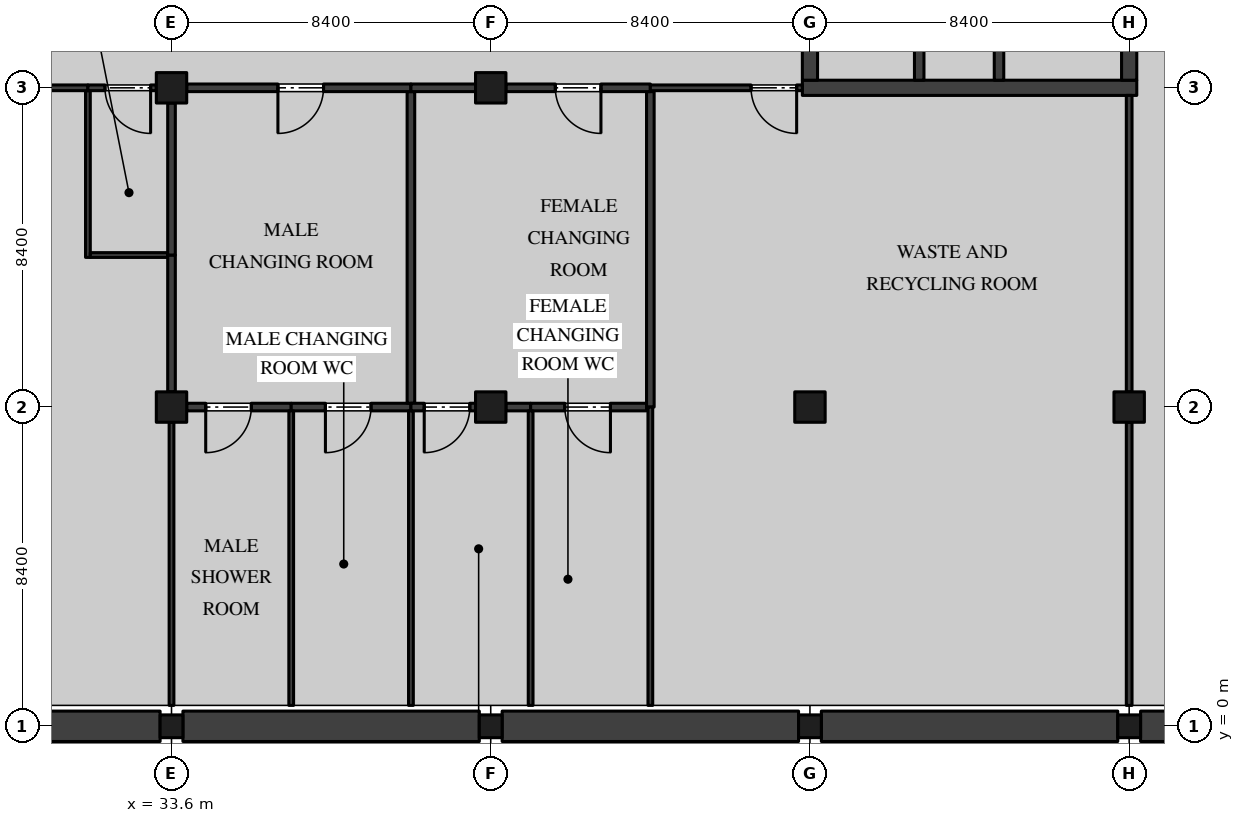
"""IFC4 building model, lengths in metres.
Left out: names, types, materials, properties, quantities, classifications, styles, units other than length and angle.
Written with IfcOpenShell. Run it as: python <this file> out.ifc"""

import sys

from ifc_helpers import new_model, si_unit, direction, frame, frame_2d, origin, origin_2d, place, context, subcontext, project, spatial, rectangle, extrude, element, fill, save


model = new_model("IFC4")
c1 = context("Model", 3, precision=1e-05, world=origin(), true_north=direction((0.0, 1.0)))
c2 = subcontext(c1, "Body", "Model", "MODEL_VIEW")
j1 = project(units=[si_unit("LENGTHUNIT", "METRE"), si_unit("PLANEANGLEUNIT", "RADIAN")], contexts=[c1])
p1 = place(None, origin())
s1 = spatial("IfcSite", under=j1, at=p1, CompositionType="ELEMENT")
p2 = place(p1, origin())
s2 = spatial("IfcBuilding", under=s1, at=p2, CompositionType="ELEMENT")
p3 = place(p2, frame((0.0, 0.0, -4.5)))
s3 = spatial("IfcBuildingStorey", under=s2, at=p3, CompositionType="ELEMENT", Elevation=-4.5)
p4 = place(p3, frame((33.6, 0.0, 0.0), z_axis=(0.0, 0.0, 1.0), x_axis=(1.0, 0.0, 0.0)))
e1 = element("IfcColumn", 1, at=p4, inside=s3, PredefinedType="COLUMN", context=c2, shape_type="SweptSolid", body=[
    extrude(rectangle(XDim=0.6, YDim=0.6, at=origin_2d()), origin(), (0.0, 0.0, 1.0), 4.05),
])
for number, where, z_axis, x_axis in (
    (2, (33.6, 8.4, 0.0), (0.0, 0.0, 1.0), (1.0, 0.0, 0.0)),
    (3, (33.6, 16.8, 0.0), (0.0, 0.0, 1.0), (1.0, 0.0, 0.0)),
):
    element("IfcColumn", number, at=place(p3, frame(where, z_axis=z_axis, x_axis=x_axis)), inside=s3, PredefinedType="COLUMN", context=c2, shape_type="SweptSolid", body=[
        extrude(rectangle(XDim=0.8, YDim=0.8, at=origin_2d()), origin(), (0.0, 0.0, 1.0), 4.05),
    ])
p5 = place(p3, frame((42.0, 0.0, 0.0), z_axis=(0.0, 0.0, 1.0), x_axis=(1.0, 0.0, 0.0)))
e4 = element("IfcColumn", 4, at=p5, inside=s3, PredefinedType="COLUMN", context=c2, shape_type="SweptSolid", body=[
    extrude(rectangle(XDim=0.6, YDim=0.6, at=origin_2d()), origin(), (0.0, 0.0, 1.0), 4.05),
])
for number, where, z_axis, x_axis in (
    (5, (42.0, 8.4, 0.0), (0.0, 0.0, 1.0), (1.0, 0.0, 0.0)),
    (6, (42.0, 16.8, 0.0), (0.0, 0.0, 1.0), (1.0, 0.0, 0.0)),
):
    element("IfcColumn", number, at=place(p3, frame(where, z_axis=z_axis, x_axis=x_axis)), inside=s3, PredefinedType="COLUMN", context=c2, shape_type="SweptSolid", body=[
        extrude(rectangle(XDim=0.8, YDim=0.8, at=origin_2d()), origin(), (0.0, 0.0, 1.0), 4.05),
    ])
p6 = place(p3, frame((50.4, 0.0, 0.0), z_axis=(0.0, 0.0, 1.0), x_axis=(1.0, 0.0, 0.0)))
e7 = element("IfcColumn", 7, at=p6, inside=s3, PredefinedType="COLUMN", context=c2, shape_type="SweptSolid", body=[
    extrude(rectangle(XDim=0.6, YDim=0.6, at=origin_2d()), origin(), (0.0, 0.0, 1.0), 4.05),
])
p7 = place(p3, frame((50.4, 8.4, 0.0), z_axis=(0.0, 0.0, 1.0), x_axis=(1.0, 0.0, 0.0)))
e8 = element("IfcColumn", 8, at=p7, inside=s3, PredefinedType="COLUMN", context=c2, shape_type="SweptSolid", body=[
    extrude(rectangle(XDim=0.8, YDim=0.8, at=origin_2d()), origin(), (0.0, 0.0, 1.0), 4.05),
])
p8 = place(p3, frame((58.8, 0.0, 0.0), z_axis=(0.0, 0.0, 1.0), x_axis=(1.0, 0.0, 0.0)))
e9 = element("IfcColumn", 9, at=p8, inside=s3, PredefinedType="COLUMN", context=c2, shape_type="SweptSolid", body=[
    extrude(rectangle(XDim=0.6, YDim=0.6, at=origin_2d()), origin(), (0.0, 0.0, 1.0), 4.05),
])
p9 = place(p3, frame((58.8, 8.4, 0.0), z_axis=(0.0, 0.0, 1.0), x_axis=(1.0, 0.0, 0.0)))
e10 = element("IfcColumn", 10, at=p9, inside=s3, PredefinedType="COLUMN", context=c2, shape_type="SweptSolid", body=[
    extrude(rectangle(XDim=0.8, YDim=0.8, at=origin_2d()), origin(), (0.0, 0.0, 1.0), 4.05),
])
for number, where, z_axis, x_axis in (
    (11, (25.5, 0.0, 0.0), (0.0, 0.0, 1.0), (1.0, 0.0, 0.0)),
    (12, (33.9, 0.0, 0.0), (0.0, 0.0, 1.0), (1.0, 0.0, 0.0)),
    (13, (42.3, 0.0, 0.0), (0.0, 0.0, 1.0), (1.0, 0.0, 0.0)),
    (14, (50.7, 0.0, 0.0), (0.0, 0.0, 1.0), (1.0, 0.0, 0.0)),
):
    element("IfcWall", number, at=place(p3, frame(where, z_axis=z_axis, x_axis=x_axis)), inside=s3, PredefinedType="SOLIDWALL", context=c2, shape_type="SweptSolid", body=[
        extrude(rectangle(XDim=7.8, YDim=0.8, at=frame_2d((3.9, 0.0))), origin(), (0.0, 0.0, 1.0), 4.05),
    ])
p10 = place(p3, frame((59.1, 0.0, 0.0), z_axis=(0.0, 0.0, 1.0), x_axis=(1.0, 0.0, 0.0)))
e15 = element("IfcWall", 15, at=p10, inside=s3, PredefinedType="SOLIDWALL", context=c2, shape_type="SweptSolid", body=[
    extrude(rectangle(XDim=7.8, YDim=0.8, at=frame_2d((3.9, 0.0))), origin(), (0.0, 0.0, 1.0), 4.05),
])
p11 = place(p3, frame((50.2, 16.8, 0.0), z_axis=(0.0, 0.0, 1.0), x_axis=(1.0, 0.0, 0.0)))
e16 = element("IfcWall", 16, at=p11, inside=s3, PredefinedType="SHEAR", context=c2, shape_type="SweptSolid", body=[
    extrude(rectangle(XDim=8.8, YDim=0.4, at=frame_2d((4.4, 0.0))), origin(), (0.0, 0.0, 1.0), 4.05),
])
p12 = place(p3, frame((50.4, 17.0, 0.0), z_axis=(0.0, 0.0, 1.0), x_axis=(0.0, 1.0, 0.0)))
e17 = element("IfcWall", 17, at=p12, inside=s3, PredefinedType="SHEAR", context=c2, shape_type="SweptSolid", body=[
    extrude(rectangle(XDim=8.0, YDim=0.4, at=frame_2d((4.0, 0.0))), origin(), (0.0, 0.0, 1.0), 4.05),
])
p13 = place(p12, frame((6.2, 0.0, 0.0)))
e18 = element("IfcOpeningElement", 18, at=p13, cuts=e17, PredefinedType="OPENING", context=c2, shape_type="SweptSolid", body=[
    extrude(rectangle(XDim=1.2, YDim=2.1, at=frame_2d((0.6, 1.05))), frame((0.0, 0.21, 0.0), z_axis=(0.0, -1.0, 0.0), x_axis=(1.0, 0.0, 0.0)), (0.0, 0.0, 1.0), 0.42),
])
p14 = place(p3, frame((58.8, 17.0, 0.0), z_axis=(0.0, 0.0, 1.0), x_axis=(0.0, 1.0, 0.0)))
e19 = element("IfcWall", 19, at=p14, inside=s3, PredefinedType="SHEAR", context=c2, shape_type="SweptSolid", body=[
    extrude(rectangle(XDim=8.0, YDim=0.4, at=frame_2d((4.0, 0.0))), origin(), (0.0, 0.0, 1.0), 4.05),
])
p15 = place(p3, frame((55.375, 25.0, 0.0), z_axis=(0.0, 0.0, 1.0), x_axis=(0.0, -1.0, 0.0)))
e20 = element("IfcWall", 20, at=p15, inside=s3, PredefinedType="SOLIDWALL", context=c2, shape_type="SweptSolid", body=[
    extrude(rectangle(XDim=8.0, YDim=0.25, at=frame_2d((4.0, 0.0))), origin(), (0.0, 0.0, 1.0), 4.05),
])
p16 = place(p15, frame((0.2, 0.0, 0.0)))
e21 = element("IfcOpeningElement", 21, at=p16, cuts=e20, PredefinedType="OPENING", context=c2, shape_type="SweptSolid", body=[
    extrude(rectangle(XDim=1.1, YDim=2.1, at=frame_2d((0.55, 1.05))), frame((0.0, 0.135, 0.0), z_axis=(0.0, -1.0, 0.0), x_axis=(1.0, 0.0, 0.0)), (0.0, 0.0, 1.0), 0.27),
])
p17 = place(p3, frame((53.275, 19.95, 0.0), z_axis=(0.0, 0.0, 1.0), x_axis=(0.0, -1.0, 0.0)))
e22 = element("IfcWall", 22, at=p17, inside=s3, PredefinedType="SOLIDWALL", context=c2, shape_type="SweptSolid", body=[
    extrude(rectangle(XDim=2.95, YDim=0.25, at=frame_2d((1.475, 0.0))), origin(), (0.0, 0.0, 1.0), 4.05),
])
p18 = place(p17, frame((1.075, 0.0, 0.0)))
e23 = element("IfcOpeningElement", 23, at=p18, cuts=e22, PredefinedType="OPENING", context=c2, shape_type="SweptSolid", body=[
    extrude(rectangle(XDim=0.8, YDim=2.1, at=frame_2d((0.4, 1.05))), frame((0.0, 0.135, 0.0), z_axis=(0.0, -1.0, 0.0), x_axis=(1.0, 0.0, 0.0)), (0.0, 0.0, 1.0), 0.27),
])
p19 = place(p3, frame((31.4, 12.338, 0.0), z_axis=(0.0, 0.0, 1.0), x_axis=(0.0, 1.0, 0.0)))
e24 = element("IfcWall", 24, at=p19, inside=s3, PredefinedType="PARTITIONING", context=c2, shape_type="SweptSolid", body=[
    extrude(rectangle(XDim=4.387, YDim=0.125, at=frame_2d((2.194, 0.0))), origin(), (0.0, 0.0, 1.0), 4.05),
])
p20 = place(p3, frame((31.462, 12.4, 0.0), z_axis=(0.0, 0.0, 1.0), x_axis=(1.0, 0.0, 0.0)))
e25 = element("IfcWall", 25, at=p20, inside=s3, PredefinedType="PARTITIONING", context=c2, shape_type="SweptSolid", body=[
    extrude(rectangle(XDim=2.038, YDim=0.125, at=frame_2d((1.019, 0.0))), origin(), (0.0, 0.0, 1.0), 4.05),
])
p21 = place(p3, frame((33.6, 8.8, 0.0), z_axis=(0.0, 0.0, 1.0), x_axis=(0.0, 1.0, 0.0)))
e26 = element("IfcWall", 26, at=p21, inside=s3, PredefinedType="PARTITIONING", context=c2, shape_type="SweptSolid", body=[
    extrude(rectangle(XDim=3.6, YDim=0.2, at=frame_2d((1.8, 0.0))), origin(), (0.0, 0.0, 1.0), 4.05),
])
p22 = place(p3, frame((33.6, 0.55, 0.0), z_axis=(0.0, 0.0, 1.0), x_axis=(0.0, 1.0, 0.0)))
e27 = element("IfcWall", 27, at=p22, inside=s3, PredefinedType="PARTITIONING", context=c2, shape_type="SweptSolid", body=[
    extrude(rectangle(XDim=7.45, YDim=0.125, at=frame_2d((3.725, 0.0))), origin(), (0.0, 0.0, 1.0), 4.05),
])
p23 = place(p3, frame((25.6, 16.8, 0.0), z_axis=(0.0, 0.0, 1.0), x_axis=(1.0, 0.0, 0.0)))
e28 = element("IfcWall", 28, at=p23, inside=s3, PredefinedType="PARTITIONING", context=c2, shape_type="SweptSolid", body=[
    extrude(rectangle(XDim=5.8, YDim=0.15, at=frame_2d((2.9, 0.0))), origin(), (0.0, 0.0, 1.0), 4.05),
])
p24 = place(p23, frame((1.8, 0.0, 0.0)))
e29 = element("IfcOpeningElement", 29, at=p24, cuts=e28, PredefinedType="OPENING", context=c2, shape_type="SweptSolid", body=[
    extrude(rectangle(XDim=1.2, YDim=2.1, at=frame_2d((0.6, 1.05))), frame((0.0, 0.085, 0.0), z_axis=(0.0, -1.0, 0.0), x_axis=(1.0, 0.0, 0.0)), (0.0, 0.0, 1.0), 0.17),
])
p25 = place(p3, frame((33.6, 12.4, 0.0), z_axis=(0.0, 0.0, 1.0), x_axis=(0.0, 1.0, 0.0)))
e30 = element("IfcWall", 30, at=p25, inside=s3, PredefinedType="PARTITIONING", context=c2, shape_type="SweptSolid", body=[
    extrude(rectangle(XDim=4.0, YDim=0.2, at=frame_2d((2.0, 0.0))), origin(), (0.0, 0.0, 1.0), 4.05),
])
p26 = place(p3, frame((31.4, 16.8, 0.0), z_axis=(0.0, 0.0, 1.0), x_axis=(1.0, 0.0, 0.0)))
e31 = element("IfcWall", 31, at=p26, inside=s3, PredefinedType="PARTITIONING", context=c2, shape_type="SweptSolid", body=[
    extrude(rectangle(XDim=1.8, YDim=0.15, at=frame_2d((0.9, 0.0))), origin(), (0.0, 0.0, 1.0), 4.05),
])
p27 = place(p26, frame((0.45, 0.0, 0.0)))
e32 = element("IfcOpeningElement", 32, at=p27, cuts=e31, PredefinedType="OPENING", context=c2, shape_type="SweptSolid", body=[
    extrude(rectangle(XDim=1.2, YDim=2.1, at=frame_2d((0.6, 1.05))), frame((0.0, 0.085, 0.0), z_axis=(0.0, -1.0, 0.0), x_axis=(1.0, 0.0, 0.0)), (0.0, 0.0, 1.0), 0.17),
])
p28 = place(p3, frame((34.0, 8.4, 0.0), z_axis=(0.0, 0.0, 1.0), x_axis=(1.0, 0.0, 0.0)))
e33 = element("IfcWall", 33, at=p28, inside=s3, PredefinedType="PARTITIONING", context=c2, shape_type="SweptSolid", body=[
    extrude(rectangle(XDim=2.75, YDim=0.2, at=frame_2d((1.375, 0.0))), origin(), (0.0, 0.0, 1.0), 4.05),
])
p29 = place(p28, frame((0.5, 0.0, 0.0)))
e34 = element("IfcOpeningElement", 34, at=p29, cuts=e33, PredefinedType="OPENING", context=c2, shape_type="SweptSolid", body=[
    extrude(rectangle(XDim=1.2, YDim=2.1, at=frame_2d((0.6, 1.05))), frame((0.0, 0.11, 0.0), z_axis=(0.0, -1.0, 0.0), x_axis=(1.0, 0.0, 0.0)), (0.0, 0.0, 1.0), 0.22),
])
p30 = place(p3, frame((36.75, 8.4, 0.0), z_axis=(0.0, 0.0, 1.0), x_axis=(1.0, 0.0, 0.0)))
e35 = element("IfcWall", 35, at=p30, inside=s3, PredefinedType="PARTITIONING", context=c2, shape_type="SweptSolid", body=[
    extrude(rectangle(XDim=3.15, YDim=0.2, at=frame_2d((1.575, 0.0))), origin(), (0.0, 0.0, 1.0), 4.05),
])
p31 = place(p30, frame((0.9, 0.0, 0.0)))
e36 = element("IfcOpeningElement", 36, at=p31, cuts=e35, PredefinedType="OPENING", context=c2, shape_type="SweptSolid", body=[
    extrude(rectangle(XDim=1.2, YDim=2.1, at=frame_2d((0.6, 1.05))), frame((0.0, 0.11, 0.0), z_axis=(0.0, -1.0, 0.0), x_axis=(1.0, 0.0, 0.0)), (0.0, 0.0, 1.0), 0.22),
])
p32 = place(p3, frame((39.9, 8.5, 0.0), z_axis=(0.0, 0.0, 1.0), x_axis=(0.0, 1.0, 0.0)))
e37 = element("IfcWall", 37, at=p32, inside=s3, PredefinedType="PARTITIONING", context=c2, shape_type="SweptSolid", body=[
    extrude(rectangle(XDim=8.2, YDim=0.2, at=frame_2d((4.1, 0.0))), origin(), (0.0, 0.0, 1.0), 4.05),
])
p33 = place(p3, frame((34.0, 16.8, 0.0), z_axis=(0.0, 0.0, 1.0), x_axis=(1.0, 0.0, 0.0)))
e38 = element("IfcWall", 38, at=p33, inside=s3, PredefinedType="PARTITIONING", context=c2, shape_type="SweptSolid", body=[
    extrude(rectangle(XDim=5.9, YDim=0.2, at=frame_2d((2.95, 0.0))), origin(), (0.0, 0.0, 1.0), 4.05),
])
p34 = place(p33, frame((2.4, 0.0, 0.0)))
e39 = element("IfcOpeningElement", 39, at=p34, cuts=e38, PredefinedType="OPENING", context=c2, shape_type="SweptSolid", body=[
    extrude(rectangle(XDim=1.2, YDim=2.1, at=frame_2d((0.6, 1.05))), frame((0.0, 0.11, 0.0), z_axis=(0.0, -1.0, 0.0), x_axis=(1.0, 0.0, 0.0)), (0.0, 0.0, 1.0), 0.22),
])
for number, where, z_axis, x_axis in (
    (40, (36.75, 0.55, 0.0), (0.0, 0.0, 1.0), (0.0, 1.0, 0.0)),
    (41, (39.9, 0.55, 0.0), (0.0, 0.0, 1.0), (0.0, 1.0, 0.0)),
):
    element("IfcWall", number, at=place(p3, frame(where, z_axis=z_axis, x_axis=x_axis)), inside=s3, PredefinedType="PARTITIONING", context=c2, shape_type="SweptSolid", body=[
        extrude(rectangle(XDim=7.75, YDim=0.125, at=frame_2d((3.875, 0.0))), origin(), (0.0, 0.0, 1.0), 4.05),
    ])
p35 = place(p3, frame((39.9, 8.4, 0.0), z_axis=(0.0, 0.0, 1.0), x_axis=(1.0, 0.0, 0.0)))
e42 = element("IfcWall", 42, at=p35, inside=s3, PredefinedType="PARTITIONING", context=c2, shape_type="SweptSolid", body=[
    extrude(rectangle(XDim=1.7, YDim=0.2, at=frame_2d((0.85, 0.0))), origin(), (0.0, 0.0, 1.0), 4.05),
])
p36 = place(p35, frame((0.35, 0.0, 0.0)))
e43 = element("IfcOpeningElement", 43, at=p36, cuts=e42, PredefinedType="OPENING", context=c2, shape_type="SweptSolid", body=[
    extrude(rectangle(XDim=1.2, YDim=2.1, at=frame_2d((0.6, 1.05))), frame((0.0, 0.11, 0.0), z_axis=(0.0, -1.0, 0.0), x_axis=(1.0, 0.0, 0.0)), (0.0, 0.0, 1.0), 0.22),
])
p37 = place(p3, frame((42.4, 8.4, 0.0), z_axis=(0.0, 0.0, 1.0), x_axis=(1.0, 0.0, 0.0)))
e44 = element("IfcWall", 44, at=p37, inside=s3, PredefinedType="PARTITIONING", context=c2, shape_type="SweptSolid", body=[
    extrude(rectangle(XDim=0.65, YDim=0.2, at=frame_2d((0.325, 0.0))), origin(), (0.0, 0.0, 1.0), 4.05),
])
p38 = place(p3, frame((43.05, 8.4, 0.0), z_axis=(0.0, 0.0, 1.0), x_axis=(1.0, 0.0, 0.0)))
e45 = element("IfcWall", 45, at=p38, inside=s3, PredefinedType="PARTITIONING", context=c2, shape_type="SweptSolid", body=[
    extrude(rectangle(XDim=3.05, YDim=0.2, at=frame_2d((1.525, 0.0))), origin(), (0.0, 0.0, 1.0), 4.05),
])
p39 = place(p38, frame((0.9, 0.0, 0.0)))
e46 = element("IfcOpeningElement", 46, at=p39, cuts=e45, PredefinedType="OPENING", context=c2, shape_type="SweptSolid", body=[
    extrude(rectangle(XDim=1.2, YDim=2.1, at=frame_2d((0.6, 1.05))), frame((0.0, 0.11, 0.0), z_axis=(0.0, -1.0, 0.0), x_axis=(1.0, 0.0, 0.0)), (0.0, 0.0, 1.0), 0.22),
])
p40 = place(p3, frame((46.2, 8.4, 0.0), z_axis=(0.0, 0.0, 1.0), x_axis=(0.0, 1.0, 0.0)))
e47 = element("IfcWall", 47, at=p40, inside=s3, PredefinedType="PARTITIONING", context=c2, shape_type="SweptSolid", body=[
    extrude(rectangle(XDim=8.3, YDim=0.2, at=frame_2d((4.15, 0.0))), origin(), (0.0, 0.0, 1.0), 4.05),
])
p41 = place(p3, frame((39.9, 16.8, 0.0), z_axis=(0.0, 0.0, 1.0), x_axis=(1.0, 0.0, 0.0)))
e48 = element("IfcWall", 48, at=p41, inside=s3, PredefinedType="PARTITIONING", context=c2, shape_type="SweptSolid", body=[
    extrude(rectangle(XDim=1.7, YDim=0.2, at=frame_2d((0.85, 0.0))), origin(), (0.0, 0.0, 1.0), 4.05),
])
p42 = place(p3, frame((42.4, 16.8, 0.0), z_axis=(0.0, 0.0, 1.0), x_axis=(1.0, 0.0, 0.0)))
e49 = element("IfcWall", 49, at=p42, inside=s3, PredefinedType="PARTITIONING", context=c2, shape_type="SweptSolid", body=[
    extrude(rectangle(XDim=3.8, YDim=0.2, at=frame_2d((1.9, 0.0))), origin(), (0.0, 0.0, 1.0), 4.05),
])
p43 = place(p42, frame((1.3, 0.0, 0.0)))
e50 = element("IfcOpeningElement", 50, at=p43, cuts=e49, PredefinedType="OPENING", context=c2, shape_type="SweptSolid", body=[
    extrude(rectangle(XDim=1.2, YDim=2.1, at=frame_2d((0.6, 1.05))), frame((0.0, 0.11, 0.0), z_axis=(0.0, -1.0, 0.0), x_axis=(1.0, 0.0, 0.0)), (0.0, 0.0, 1.0), 0.22),
])
p44 = place(p3, frame((43.05, 0.55, 0.0), z_axis=(0.0, 0.0, 1.0), x_axis=(0.0, 1.0, 0.0)))
e51 = element("IfcWall", 51, at=p44, inside=s3, PredefinedType="PARTITIONING", context=c2, shape_type="SweptSolid", body=[
    extrude(rectangle(XDim=7.75, YDim=0.125, at=frame_2d((3.875, 0.0))), origin(), (0.0, 0.0, 1.0), 4.05),
])
p45 = place(p3, frame((46.2, 0.55, 0.0), z_axis=(0.0, 0.0, 1.0), x_axis=(0.0, 1.0, 0.0)))
e52 = element("IfcWall", 52, at=p45, inside=s3, PredefinedType="PARTITIONING", context=c2, shape_type="SweptSolid", body=[
    extrude(rectangle(XDim=7.85, YDim=0.125, at=frame_2d((3.925, 0.0))), origin(), (0.0, 0.0, 1.0), 4.05),
])
p46 = place(p3, frame((46.2, 16.8, 0.0), z_axis=(0.0, 0.0, 1.0), x_axis=(1.0, 0.0, 0.0)))
e53 = element("IfcWall", 53, at=p46, inside=s3, PredefinedType="PARTITIONING", context=c2, shape_type="SweptSolid", body=[
    extrude(rectangle(XDim=4.0, YDim=0.15, at=frame_2d((2.0, 0.0))), origin(), (0.0, 0.0, 1.0), 4.05),
])
p47 = place(p46, frame((2.65, 0.0, 0.0)))
e54 = element("IfcOpeningElement", 54, at=p47, cuts=e53, PredefinedType="OPENING", context=c2, shape_type="SweptSolid", body=[
    extrude(rectangle(XDim=1.2, YDim=2.1, at=frame_2d((0.6, 1.05))), frame((0.0, 0.085, 0.0), z_axis=(0.0, -1.0, 0.0), x_axis=(1.0, 0.0, 0.0)), (0.0, 0.0, 1.0), 0.17),
])
p48 = place(p3, frame((58.8, 0.55, 0.0), z_axis=(0.0, 0.0, 1.0), x_axis=(0.0, 1.0, 0.0)))
e55 = element("IfcWall", 55, at=p48, inside=s3, PredefinedType="PARTITIONING", context=c2, shape_type="SweptSolid", body=[
    extrude(rectangle(XDim=7.45, YDim=0.15, at=frame_2d((3.725, 0.0))), origin(), (0.0, 0.0, 1.0), 4.05),
])
p49 = place(p3, frame((58.8, 8.8, 0.0), z_axis=(0.0, 0.0, 1.0), x_axis=(0.0, 1.0, 0.0)))
e56 = element("IfcWall", 56, at=p49, inside=s3, PredefinedType="PARTITIONING", context=c2, shape_type="SweptSolid", body=[
    extrude(rectangle(XDim=7.8, YDim=0.15, at=frame_2d((3.9, 0.0))), origin(), (0.0, 0.0, 1.0), 4.05),
])
p50 = place(p27, frame((1.2, 0.0, 0.0), z_axis=(0.0, 0.0, 1.0), x_axis=(-1.0, 0.0, 0.0)))
e57 = element("IfcDoor", 57, at=p50, inside=s3, OperationType="SINGLE_SWING_RIGHT", PredefinedType="DOOR", context=c2, shape_type="SweptSolid", body=[
    extrude(rectangle(XDim=1.2, YDim=2.1, at=frame_2d((0.6, 1.05))), frame((0.0, 0.03, 0.0), z_axis=(0.0, -1.0, 0.0), x_axis=(1.0, 0.0, 0.0)), (0.0, 0.0, 1.0), 0.06),
])
fill(e32, e57)
p51 = place(p34, frame((1.2, 0.0, 0.0), z_axis=(0.0, 0.0, 1.0), x_axis=(-1.0, 0.0, 0.0)))
e58 = element("IfcDoor", 58, at=p51, inside=s3, OperationType="SINGLE_SWING_LEFT", PredefinedType="DOOR", context=c2, shape_type="SweptSolid", body=[
    extrude(rectangle(XDim=1.2, YDim=2.1, at=frame_2d((0.6, 1.05))), frame((0.0, 0.035, 0.0), z_axis=(0.0, -1.0, 0.0), x_axis=(1.0, 0.0, 0.0)), (0.0, 0.0, 1.0), 0.07),
])
fill(e39, e58)
p52 = place(p29, frame((1.2, 0.0, 0.0), z_axis=(0.0, 0.0, 1.0), x_axis=(-1.0, 0.0, 0.0)))
e59 = element("IfcDoor", 59, at=p52, inside=s3, OperationType="SINGLE_SWING_LEFT", PredefinedType="DOOR", context=c2, shape_type="SweptSolid", body=[
    extrude(rectangle(XDim=1.2, YDim=2.1, at=frame_2d((0.6, 1.05))), frame((0.0, 0.035, 0.0), z_axis=(0.0, -1.0, 0.0), x_axis=(1.0, 0.0, 0.0)), (0.0, 0.0, 1.0), 0.07),
])
fill(e34, e59)
p53 = place(p31, frame((1.2, 0.0, 0.0), z_axis=(0.0, 0.0, 1.0), x_axis=(-1.0, 0.0, 0.0)))
e60 = element("IfcDoor", 60, at=p53, inside=s3, OperationType="SINGLE_SWING_LEFT", PredefinedType="DOOR", context=c2, shape_type="SweptSolid", body=[
    extrude(rectangle(XDim=1.2, YDim=2.1, at=frame_2d((0.6, 1.05))), frame((0.0, 0.035, 0.0), z_axis=(0.0, -1.0, 0.0), x_axis=(1.0, 0.0, 0.0)), (0.0, 0.0, 1.0), 0.07),
])
fill(e36, e60)
p54 = place(p43, frame((1.2, 0.0, 0.0), z_axis=(0.0, 0.0, 1.0), x_axis=(-1.0, 0.0, 0.0)))
e61 = element("IfcDoor", 61, at=p54, inside=s3, OperationType="SINGLE_SWING_RIGHT", PredefinedType="DOOR", context=c2, shape_type="SweptSolid", body=[
    extrude(rectangle(XDim=1.2, YDim=2.1, at=frame_2d((0.6, 1.05))), frame((0.0, 0.035, 0.0), z_axis=(0.0, -1.0, 0.0), x_axis=(1.0, 0.0, 0.0)), (0.0, 0.0, 1.0), 0.07),
])
fill(e50, e61)
p55 = place(p36, frame((1.2, 0.0, 0.0), z_axis=(0.0, 0.0, 1.0), x_axis=(-1.0, 0.0, 0.0)))
e62 = element("IfcDoor", 62, at=p55, inside=s3, OperationType="SINGLE_SWING_LEFT", PredefinedType="DOOR", context=c2, shape_type="SweptSolid", body=[
    extrude(rectangle(XDim=1.2, YDim=2.1, at=frame_2d((0.6, 1.05))), frame((0.0, 0.035, 0.0), z_axis=(0.0, -1.0, 0.0), x_axis=(1.0, 0.0, 0.0)), (0.0, 0.0, 1.0), 0.07),
])
fill(e43, e62)
p56 = place(p39, frame((1.2, 0.0, 0.0), z_axis=(0.0, 0.0, 1.0), x_axis=(-1.0, 0.0, 0.0)))
e63 = element("IfcDoor", 63, at=p56, inside=s3, OperationType="SINGLE_SWING_RIGHT", PredefinedType="DOOR", context=c2, shape_type="SweptSolid", body=[
    extrude(rectangle(XDim=1.2, YDim=2.1, at=frame_2d((0.6, 1.05))), frame((0.0, 0.035, 0.0), z_axis=(0.0, -1.0, 0.0), x_axis=(1.0, 0.0, 0.0)), (0.0, 0.0, 1.0), 0.07),
])
fill(e46, e63)
p57 = place(p47, frame((1.2, 0.0, 0.0), z_axis=(0.0, 0.0, 1.0), x_axis=(-1.0, 0.0, 0.0)))
e64 = element("IfcDoor", 64, at=p57, inside=s3, OperationType="SINGLE_SWING_RIGHT", PredefinedType="DOOR", context=c2, shape_type="SweptSolid", body=[
    extrude(rectangle(XDim=1.2, YDim=2.1, at=frame_2d((0.6, 1.05))), frame((0.0, 0.03, 0.0), z_axis=(0.0, -1.0, 0.0), x_axis=(1.0, 0.0, 0.0)), (0.0, 0.0, 1.0), 0.06),
])
fill(e54, e64)
save(model, sys.argv[1])
